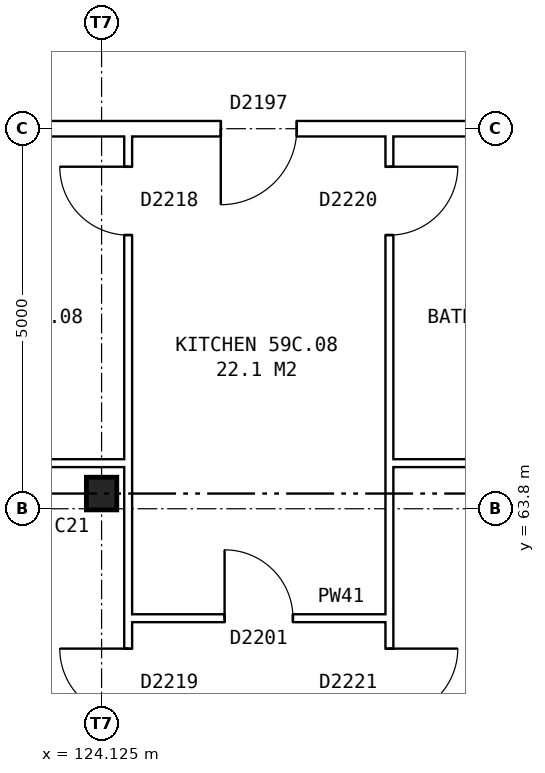
"""IFC4 building model, lengths in metres.
Left out: names, types, materials, properties, quantities, classifications, styles, units other than length and angle.
Written with IfcOpenShell. Run it as: python <this file> out.ifc"""

import sys

from ifc_helpers import new_model, si_unit, direction, frame, frame_2d, origin, origin_2d, place, context, subcontext, project, spatial, rectangle, i_section, extrude, element, fill, save


model = new_model("IFC4")
c1 = context("Model", 3, precision=1e-05, world=origin(), true_north=direction((0.0, 1.0)))
c2 = subcontext(c1, "Body", "Model", "MODEL_VIEW")
j1 = project(units=[si_unit("LENGTHUNIT", "METRE"), si_unit("PLANEANGLEUNIT", "RADIAN")], contexts=[c1])
p1 = place(None, origin())
s1 = spatial("IfcSite", under=j1, at=p1, CompositionType="ELEMENT")
p2 = place(p1, origin())
s2 = spatial("IfcBuilding", under=s1, at=p2, CompositionType="ELEMENT")
p3 = place(p2, frame((0.0, 0.0, 209.0)))
s3 = spatial("IfcBuildingStorey", under=s2, at=p3, CompositionType="ELEMENT", Elevation=209.0)
p4 = place(p3, frame((124.125, 64.0, 0.0), z_axis=(0.0, 0.0, 1.0), x_axis=(1.0, 0.0, 0.0)))
e1 = element("IfcColumn", 1, at=p4, inside=s3, PredefinedType="COLUMN", context=c2, shape_type="SweptSolid", body=[
    extrude(i_section(OverallWidth=0.4, OverallDepth=0.43, WebThickness=0.04, FlangeThickness=0.04, at=origin_2d()), origin(), (0.0, 0.0, 1.0), 2.85),
])
p5 = place(p3, frame((124.475, 62.36, 0.0), z_axis=(0.0, 0.0, 1.0), x_axis=(1.0, 0.0, 0.0)))
e2 = element("IfcWall", 2, at=p5, inside=s3, PredefinedType="PARTITIONING", context=c2, shape_type="SweptSolid", body=[
    extrude(rectangle(XDim=3.437, YDim=0.1, at=frame_2d((1.719, 0.0))), origin(), (0.0, 0.0, 1.0), 2.85),
])
p6 = place(p5, frame((1.269, 0.0, 0.0)))
e3 = element("IfcOpeningElement", 3, at=p6, cuts=e2, PredefinedType="OPENING", context=c2, shape_type="SweptSolid", body=[
    extrude(rectangle(XDim=0.9, YDim=2.1, at=frame_2d((0.45, 1.05))), frame((0.0, 0.06, 0.0), z_axis=(0.0, -1.0, 0.0), x_axis=(1.0, 0.0, 0.0)), (0.0, 0.0, 1.0), 0.12),
])
p7 = place(p3, frame((121.137, 64.4, 0.0), z_axis=(0.0, 0.0, 1.0), x_axis=(1.0, 0.0, 0.0)))
e4 = element("IfcWall", 4, at=p7, inside=s3, PredefinedType="PARTITIONING", context=c2, shape_type="SweptSolid", body=[
    extrude(rectangle(XDim=3.338, YDim=0.1, at=frame_2d((1.669, 0.0))), origin(), (0.0, 0.0, 1.0), 2.85),
])
p8 = place(p3, frame((127.912, 64.4, 0.0), z_axis=(0.0, 0.0, 1.0), x_axis=(1.0, 0.0, 0.0)))
e5 = element("IfcWall", 5, at=p8, inside=s3, PredefinedType="PARTITIONING", context=c2, shape_type="SweptSolid", body=[
    extrude(rectangle(XDim=3.448, YDim=0.1, at=frame_2d((1.724, 0.0))), origin(), (0.0, 0.0, 1.0), 2.85),
])
p9 = place(p3, frame((75.64, 68.8, 0.0), z_axis=(0.0, 0.0, 1.0), x_axis=(1.0, 0.0, 0.0)))
e6 = element("IfcWall", 6, at=p9, inside=s3, PredefinedType="PARTITIONING", context=c2, shape_type="SweptSolid", body=[
    extrude(rectangle(XDim=55.72, YDim=0.2, at=frame_2d((27.86, 0.0))), origin(), (0.0, 0.0, 1.0), 2.85),
])
p10 = place(p9, frame((5.191, 0.0, 0.0)))
e7 = element("IfcOpeningElement", 7, at=p10, cuts=e6, PredefinedType="OPENING", context=c2, shape_type="SweptSolid", body=[
    extrude(rectangle(XDim=1.0, YDim=2.1, at=frame_2d((0.5, 1.05))), frame((0.0, 0.11, 0.0), z_axis=(0.0, -1.0, 0.0), x_axis=(1.0, 0.0, 0.0)), (0.0, 0.0, 1.0), 0.22),
])
p11 = place(p9, frame((15.678, 0.0, 0.0)))
e8 = element("IfcOpeningElement", 8, at=p11, cuts=e6, PredefinedType="OPENING", context=c2, shape_type="SweptSolid", body=[
    extrude(rectangle(XDim=1.0, YDim=2.1, at=frame_2d((0.5, 1.05))), frame((0.0, 0.11, 0.0), z_axis=(0.0, -1.0, 0.0), x_axis=(1.0, 0.0, 0.0)), (0.0, 0.0, 1.0), 0.22),
])
p12 = place(p9, frame((22.553, 0.0, 0.0)))
e9 = element("IfcOpeningElement", 9, at=p12, cuts=e6, PredefinedType="OPENING", context=c2, shape_type="SweptSolid", body=[
    extrude(rectangle(XDim=1.0, YDim=2.1, at=frame_2d((0.5, 1.05))), frame((0.0, 0.11, 0.0), z_axis=(0.0, -1.0, 0.0), x_axis=(1.0, 0.0, 0.0)), (0.0, 0.0, 1.0), 0.22),
])
p13 = place(p9, frame((32.866, 0.0, 0.0)))
e10 = element("IfcOpeningElement", 10, at=p13, cuts=e6, PredefinedType="OPENING", context=c2, shape_type="SweptSolid", body=[
    extrude(rectangle(XDim=1.0, YDim=2.1, at=frame_2d((0.5, 1.05))), frame((0.0, 0.11, 0.0), z_axis=(0.0, -1.0, 0.0), x_axis=(1.0, 0.0, 0.0)), (0.0, 0.0, 1.0), 0.22),
])
p14 = place(p9, frame((43.178, 0.0, 0.0)))
e11 = element("IfcOpeningElement", 11, at=p14, cuts=e6, PredefinedType="OPENING", context=c2, shape_type="SweptSolid", body=[
    extrude(rectangle(XDim=1.0, YDim=2.1, at=frame_2d((0.5, 1.05))), frame((0.0, 0.11, 0.0), z_axis=(0.0, -1.0, 0.0), x_axis=(1.0, 0.0, 0.0)), (0.0, 0.0, 1.0), 0.22),
])
p15 = place(p9, frame((50.053, 0.0, 0.0)))
e12 = element("IfcOpeningElement", 12, at=p15, cuts=e6, PredefinedType="OPENING", context=c2, shape_type="SweptSolid", body=[
    extrude(rectangle(XDim=1.0, YDim=2.1, at=frame_2d((0.5, 1.05))), frame((0.0, 0.11, 0.0), z_axis=(0.0, -1.0, 0.0), x_axis=(1.0, 0.0, 0.0)), (0.0, 0.0, 1.0), 0.22),
])
p16 = place(p3, frame((124.475, 54.36, 0.0), z_axis=(0.0, 0.0, 1.0), x_axis=(0.0, 1.0, 0.0)))
e13 = element("IfcWall", 13, at=p16, inside=s3, PredefinedType="PARTITIONING", context=c2, shape_type="SweptSolid", body=[
    extrude(rectangle(XDim=14.34, YDim=0.1, at=frame_2d((7.17, 0.0))), origin(), (0.0, 0.0, 1.0), 2.85),
])
p17 = place(p16, frame((6.7, 0.0, 0.0)))
e14 = element("IfcOpeningElement", 14, at=p17, cuts=e13, PredefinedType="OPENING", context=c2, shape_type="SweptSolid", body=[
    extrude(rectangle(XDim=0.9, YDim=2.1, at=frame_2d((0.45, 1.05))), frame((0.0, 0.06, 0.0), z_axis=(0.0, -1.0, 0.0), x_axis=(1.0, 0.0, 0.0)), (0.0, 0.0, 1.0), 0.12),
])
p18 = place(p16, frame((13.04, 0.0, 0.0)))
e15 = element("IfcOpeningElement", 15, at=p18, cuts=e13, PredefinedType="OPENING", context=c2, shape_type="SweptSolid", body=[
    extrude(rectangle(XDim=0.9, YDim=2.1, at=frame_2d((0.45, 1.05))), frame((0.0, 0.06, 0.0), z_axis=(0.0, -1.0, 0.0), x_axis=(1.0, 0.0, 0.0)), (0.0, 0.0, 1.0), 0.12),
])
p19 = place(p3, frame((127.912, 54.36, 0.0), z_axis=(0.0, 0.0, 1.0), x_axis=(0.0, 1.0, 0.0)))
e16 = element("IfcWall", 16, at=p19, inside=s3, PredefinedType="PARTITIONING", context=c2, shape_type="SweptSolid", body=[
    extrude(rectangle(XDim=14.34, YDim=0.1, at=frame_2d((7.17, 0.0))), origin(), (0.0, 0.0, 1.0), 2.85),
])
p20 = place(p19, frame((6.7, 0.0, 0.0)))
e17 = element("IfcOpeningElement", 17, at=p20, cuts=e16, PredefinedType="OPENING", context=c2, shape_type="SweptSolid", body=[
    extrude(rectangle(XDim=0.9, YDim=2.1, at=frame_2d((0.45, 1.05))), frame((0.0, 0.06, 0.0), z_axis=(0.0, -1.0, 0.0), x_axis=(1.0, 0.0, 0.0)), (0.0, 0.0, 1.0), 0.12),
])
p21 = place(p19, frame((13.04, 0.0, 0.0)))
e18 = element("IfcOpeningElement", 18, at=p21, cuts=e16, PredefinedType="OPENING", context=c2, shape_type="SweptSolid", body=[
    extrude(rectangle(XDim=0.9, YDim=2.1, at=frame_2d((0.45, 1.05))), frame((0.0, 0.06, 0.0), z_axis=(0.0, -1.0, 0.0), x_axis=(1.0, 0.0, 0.0)), (0.0, 0.0, 1.0), 0.12),
])
p22 = place(p17, origin())
e19 = element("IfcDoor", 19, at=p22, inside=s3, OperationType="SINGLE_SWING_RIGHT", PredefinedType="DOOR", context=c2, shape_type="SweptSolid", body=[
    extrude(rectangle(XDim=0.9, YDim=2.1, at=frame_2d((0.45, 1.05))), frame((0.0, 0.025, 0.0), z_axis=(0.0, -1.0, 0.0), x_axis=(1.0, 0.0, 0.0)), (0.0, 0.0, 1.0), 0.05),
])
fill(e14, e19)
p23 = place(p20, frame((0.9, 0.0, 0.0), z_axis=(0.0, 0.0, 1.0), x_axis=(-1.0, 0.0, 0.0)))
e20 = element("IfcDoor", 20, at=p23, inside=s3, OperationType="SINGLE_SWING_LEFT", PredefinedType="DOOR", context=c2, shape_type="SweptSolid", body=[
    extrude(rectangle(XDim=0.9, YDim=2.1, at=frame_2d((0.45, 1.05))), frame((0.0, 0.025, 0.0), z_axis=(0.0, -1.0, 0.0), x_axis=(1.0, 0.0, 0.0)), (0.0, 0.0, 1.0), 0.05),
])
fill(e17, e20)
p24 = place(p15, frame((1.0, 0.0, 0.0), z_axis=(0.0, 0.0, 1.0), x_axis=(-1.0, 0.0, 0.0)))
e21 = element("IfcDoor", 21, at=p24, inside=s3, OperationType="SINGLE_SWING_RIGHT", PredefinedType="DOOR", context=c2, shape_type="SweptSolid", body=[
    extrude(rectangle(XDim=1.0, YDim=2.1, at=frame_2d((0.5, 1.05))), frame((0.0, 0.025, 0.0), z_axis=(0.0, -1.0, 0.0), x_axis=(1.0, 0.0, 0.0)), (0.0, 0.0, 1.0), 0.05),
])
fill(e12, e21)
p25 = place(p6, origin())
e22 = element("IfcDoor", 22, at=p25, inside=s3, OperationType="SINGLE_SWING_LEFT", PredefinedType="DOOR", context=c2, shape_type="SweptSolid", body=[
    extrude(rectangle(XDim=0.9, YDim=2.1, at=frame_2d((0.45, 1.05))), frame((0.0, 0.025, 0.0), z_axis=(0.0, -1.0, 0.0), x_axis=(1.0, 0.0, 0.0)), (0.0, 0.0, 1.0), 0.05),
])
fill(e3, e22)
p26 = place(p18, origin())
e23 = element("IfcDoor", 23, at=p26, inside=s3, OperationType="SINGLE_SWING_RIGHT", PredefinedType="DOOR", context=c2, shape_type="SweptSolid", body=[
    extrude(rectangle(XDim=0.9, YDim=2.1, at=frame_2d((0.45, 1.05))), frame((0.0, 0.025, 0.0), z_axis=(0.0, -1.0, 0.0), x_axis=(1.0, 0.0, 0.0)), (0.0, 0.0, 1.0), 0.05),
])
fill(e15, e23)
p27 = place(p21, frame((0.9, 0.0, 0.0), z_axis=(0.0, 0.0, 1.0), x_axis=(-1.0, 0.0, 0.0)))
e24 = element("IfcDoor", 24, at=p27, inside=s3, OperationType="SINGLE_SWING_LEFT", PredefinedType="DOOR", context=c2, shape_type="SweptSolid", body=[
    extrude(rectangle(XDim=0.9, YDim=2.1, at=frame_2d((0.45, 1.05))), frame((0.0, 0.025, 0.0), z_axis=(0.0, -1.0, 0.0), x_axis=(1.0, 0.0, 0.0)), (0.0, 0.0, 1.0), 0.05),
])
fill(e18, e24)
save(model, sys.argv[1])
